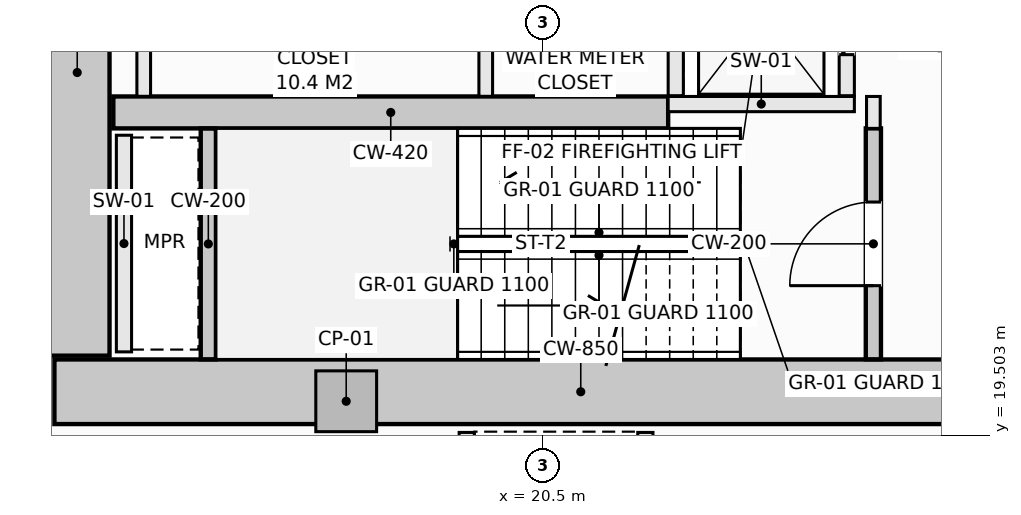
"""IFC4 building model, lengths in metres.
Left out: names, types, materials, properties, quantities, classifications, styles, units other than length and angle.
Written with IfcOpenShell. Run it as: python <this file> out.ifc"""

import sys

from ifc_helpers import new_model, si_unit, direction, frame, frame_2d, origin, origin_2d, place, context, subcontext, project, spatial, rectangle, extrude, element, fill, save


model = new_model("IFC4")
c1 = context("Model", 3, precision=1e-05, world=origin(), true_north=direction((0.0, 1.0)))
c2 = subcontext(c1, "Body", "Model", "MODEL_VIEW")
j1 = project(units=[si_unit("LENGTHUNIT", "METRE"), si_unit("PLANEANGLEUNIT", "RADIAN")], contexts=[c1])
p1 = place(None, origin())
s1 = spatial("IfcSite", under=j1, at=p1, CompositionType="ELEMENT")
p2 = place(p1, origin())
s2 = spatial("IfcBuilding", under=s1, at=p2, CompositionType="ELEMENT")
p3 = place(p2, frame((0.0, 0.0, -4.5)))
s3 = spatial("IfcBuildingStorey", under=s2, at=p3, CompositionType="ELEMENT", Elevation=-4.5)
p4 = place(p3, frame((14.075, 20.075, -0.32), z_axis=(0.0, 0.0, 1.0), x_axis=(1.0, 0.0, 0.0)))
e1 = element("IfcWall", 1, at=p4, inside=s3, PredefinedType="SHEAR", context=c2, shape_type="SweptSolid", body=[
    extrude(rectangle(XDim=13.85, YDim=0.85, at=frame_2d((6.925, 0.0))), origin(), (0.0, 0.0, 1.0), 4.46),
])
p5 = place(p3, frame((14.375, 20.55, -0.32), z_axis=(0.0, 0.0, 1.0), x_axis=(0.0, 1.0, 0.0)))
e2 = element("IfcWall", 2, at=p5, inside=s3, PredefinedType="SHEAR", context=c2, shape_type="SweptSolid", body=[
    extrude(rectangle(XDim=12.9, YDim=0.85, at=frame_2d((6.45, 0.0))), origin(), (0.0, 0.0, 1.0), 4.46),
])
p6 = place(p3, frame((14.85, 23.75, -0.32), z_axis=(0.0, 0.0, 1.0), x_axis=(1.0, 0.0, 0.0)))
e3 = element("IfcWall", 3, at=p6, inside=s3, PredefinedType="SHEAR", context=c2, shape_type="SweptSolid", body=[
    extrude(rectangle(XDim=7.3, YDim=0.42, at=frame_2d((3.65, 0.0))), origin(), (0.0, 0.0, 1.0), 4.46),
])
p7 = place(p3, frame((17.914, 19.95, -0.32), z_axis=(0.0, 0.0, 1.0), x_axis=(1.0, 0.0, 0.0)))
e4 = element("IfcColumn", 4, at=p7, inside=s3, PredefinedType="PILASTER", context=c2, shape_type="SweptSolid", body=[
    extrude(rectangle(XDim=0.8, YDim=0.8, at=origin_2d()), origin(), (0.0, 0.0, 1.0), 4.46),
])
p8 = place(p3, frame((24.85, 20.502, -0.32), z_axis=(0.0, 0.0, 1.0), x_axis=(0.0, 1.0, 0.0)))
e5 = element("IfcWall", 5, at=p8, inside=s3, PredefinedType="SHEAR", context=c2, shape_type="SweptSolid", body=[
    extrude(rectangle(XDim=3.038, YDim=0.2, at=frame_2d((1.519, 0.0))), origin(), (0.0, 0.0, 1.0), 4.46),
])
p9 = place(p8, frame((0.969, 0.0, 0.32)))
e6 = element("IfcOpeningElement", 6, at=p9, cuts=e5, PredefinedType="OPENING", context=c2, shape_type="SweptSolid", body=[
    extrude(rectangle(XDim=1.1, YDim=2.15, at=frame_2d((0.55, 1.075))), frame((0.0, 0.11, 0.0), z_axis=(0.0, -1.0, 0.0), x_axis=(1.0, 0.0, 0.0)), (0.0, 0.0, 1.0), 0.22),
])
p10 = place(p3, frame((16.1, 20.502, -0.32), z_axis=(0.0, 0.0, 1.0), x_axis=(0.0, 1.0, 0.0)))
e7 = element("IfcWall", 7, at=p10, inside=s3, PredefinedType="SHEAR", context=c2, shape_type="SweptSolid", body=[
    extrude(rectangle(XDim=3.036, YDim=0.2, at=frame_2d((1.518, 0.0))), origin(), (0.0, 0.0, 1.0), 4.46),
])
p11 = place(p3, frame((22.15, 23.86, 0.0), z_axis=(0.0, 0.0, 1.0), x_axis=(1.0, 0.0, 0.0)))
e8 = element("IfcWall", 8, at=p11, inside=s3, PredefinedType="SOLIDWALL", context=c2, shape_type="SweptSolid", body=[
    extrude(rectangle(XDim=2.45, YDim=0.2, at=frame_2d((1.225, 0.0))), origin(), (0.0, 0.0, 1.0), 4.14),
])
p12 = place(p3, frame((22.25, 23.97, 0.0), z_axis=(0.0, 0.0, 1.0), x_axis=(0.0, 1.0, 0.0)))
e9 = element("IfcWall", 9, at=p12, inside=s3, PredefinedType="SOLIDWALL", context=c2, shape_type="SweptSolid", body=[
    extrude(rectangle(XDim=2.18, YDim=0.2, at=frame_2d((1.09, 0.0))), origin(), (0.0, 0.0, 1.0), 4.14),
])
p13 = place(p3, frame((24.5, 23.97, 0.0), z_axis=(0.0, 0.0, 1.0), x_axis=(0.0, 1.0, 0.0)))
e10 = element("IfcWall", 10, at=p13, inside=s3, PredefinedType="SOLIDWALL", context=c2, shape_type="SweptSolid", body=[
    extrude(rectangle(XDim=2.18, YDim=0.2, at=frame_2d((1.09, 0.0))), origin(), (0.0, 0.0, 1.0), 4.14),
])
p14 = place(p13, frame((0.54, 0.0, 0.0)))
e11 = element("IfcOpeningElement", 11, at=p14, cuts=e10, PredefinedType="OPENING", context=c2, shape_type="SweptSolid", body=[
    extrude(rectangle(XDim=1.1, YDim=2.2, at=frame_2d((0.55, 1.1))), frame((0.0, 0.11, 0.0), z_axis=(0.0, -1.0, 0.0), x_axis=(1.0, 0.0, 0.0)), (0.0, 0.0, 1.0), 0.22),
])
for number, where, z_axis, x_axis in (
    (12, (19.5, 17.01, 0.0), (0.0, 0.0, 1.0), (0.0, 1.0, 0.0)),
    (13, (21.85, 17.01, 0.0), (0.0, 0.0, 1.0), (0.0, 1.0, 0.0)),
):
    element("IfcWall", number, at=place(p3, frame(where, z_axis=z_axis, x_axis=x_axis)), inside=s3, PredefinedType="SOLIDWALL", context=c2, shape_type="SweptSolid", body=[
        extrude(rectangle(XDim=2.53, YDim=0.2, at=frame_2d((1.265, 0.0))), origin(), (0.0, 0.0, 1.0), 4.14),
    ])
p15 = place(p3, frame((14.99, 20.6, 0.0), z_axis=(0.0, 0.0, 1.0), x_axis=(0.0, 1.0, 0.0)))
e14 = element("IfcWall", 14, at=p15, inside=s3, PredefinedType="SOLIDWALL", context=c2, shape_type="SweptSolid", body=[
    extrude(rectangle(XDim=2.85, YDim=0.2, at=frame_2d((1.425, 0.0))), origin(), (0.0, 0.0, 1.0), 4.14),
])
p16 = place(p3, frame((24.85, 23.54, 0.0), z_axis=(0.0, 0.0, 1.0), x_axis=(0.0, 1.0, 0.0)))
e15 = element("IfcWall", 15, at=p16, inside=s3, PredefinedType="SOLIDWALL", context=c2, shape_type="SweptSolid", body=[
    extrude(rectangle(XDim=0.42, YDim=0.18, at=frame_2d((0.21, 0.0))), origin(), (0.0, 0.0, 1.0), 4.14),
])
for number, where, z_axis, x_axis in (
    (16, (15.25, 23.962, 0.0), (0.0, 0.0, 1.0), (0.0, 1.0, 0.0)),
    (17, (19.75, 23.962, 0.0), (0.0, 0.0, 1.0), (0.0, 1.0, 0.0)),
):
    element("IfcWall", number, at=place(p3, frame(where, z_axis=z_axis, x_axis=x_axis)), inside=s3, PredefinedType="SOLIDWALL", context=c2, shape_type="SweptSolid", body=[
        extrude(rectangle(XDim=2.106, YDim=0.18, at=frame_2d((1.053, 0.0))), origin(), (0.0, 0.0, 1.0), 4.14),
    ])
p17 = place(p9, origin())
e18 = element("IfcDoor", 18, at=p17, inside=s3, OperationType="SINGLE_SWING_LEFT", PredefinedType="DOOR", context=c2, shape_type="SweptSolid", body=[
    extrude(rectangle(XDim=1.1, YDim=2.15, at=frame_2d((0.55, 1.075))), frame((0.0, 0.025, 0.0), z_axis=(0.0, -1.0, 0.0), x_axis=(1.0, 0.0, 0.0)), (0.0, 0.0, 1.0), 0.05),
])
fill(e6, e18)
p18 = place(p14, origin())
e19 = element("IfcDoor", 19, at=p18, inside=s3, OperationType="SLIDING_TO_LEFT", PredefinedType="DOOR", context=c2, shape_type="SweptSolid", body=[
    extrude(rectangle(XDim=1.1, YDim=2.2, at=frame_2d((0.55, 1.1))), frame((0.0, 0.025, 0.0), z_axis=(0.0, -1.0, 0.0), x_axis=(1.0, 0.0, 0.0)), (0.0, 0.0, 1.0), 0.05),
])
fill(e11, e19)
save(model, sys.argv[1])
